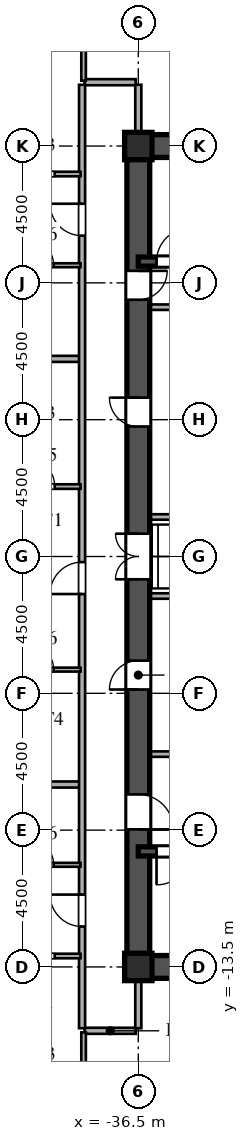
"""IFC4 building model, lengths in metres.
Left out: names, types, materials, properties, quantities, classifications, styles, units other than length and angle.
Written with IfcOpenShell. Run it as: python <this file> out.ifc"""

import sys

from ifc_helpers import new_model, si_unit, direction, frame, frame_2d, origin, origin_2d, place, context, subcontext, project, spatial, rectangle, i_section, extrude, source, transform, mapped, element, fill, save


model = new_model("IFC4")
c1 = context("Model", 3, precision=1e-05, world=origin(), true_north=direction((0.0, 1.0)))
c2 = subcontext(c1, "Body", "Model", "MODEL_VIEW")
j1 = project(units=[si_unit("LENGTHUNIT", "METRE"), si_unit("PLANEANGLEUNIT", "RADIAN")], contexts=[c1])
p1 = place(None, origin())
s1 = spatial("IfcSite", under=j1, at=p1, CompositionType="ELEMENT")
p2 = place(p1, origin())
s2 = spatial("IfcBuilding", under=s1, at=p2, CompositionType="ELEMENT")
p3 = place(p2, frame((0.0, 0.0, 22.5)))
s3 = spatial("IfcBuildingStorey", under=s2, at=p3, CompositionType="ELEMENT", Elevation=22.5)
m1 = source(origin(), c2, "Body", "SweptSolid", [
    extrude(i_section(OverallWidth=0.9, OverallDepth=0.9, WebThickness=0.036, FlangeThickness=0.055, at=origin_2d()), origin(), (0.0, 0.0, 1.0), 3.6),
])
for number, where, z_axis, x_axis in (
    (1, (-36.5, -13.5, 0.0), (0.0, 0.0, 1.0), (1.0, 0.0, 0.0)),
    (2, (-36.5, 13.5, 0.0), (0.0, 0.0, 1.0), (1.0, 0.0, 0.0)),
):
    element("IfcColumn", number, at=place(p3, frame(where, z_axis=z_axis, x_axis=x_axis)), inside=s3, PredefinedType="COLUMN", context=c2, shape_type="MappedRepresentation", body=[
        mapped(m1, transform((0.0, 0.0, 0.0), scale=1.0)),
    ])
for number, where, z_axis, x_axis in (
    (3, (-36.5, -13.5, 0.0), (0.0, 0.0, 1.0), (1.0, 0.0, 0.0)),
    (4, (-36.5, 13.5, 0.0), (0.0, 0.0, 1.0), (1.0, 0.0, 0.0)),
):
    element("IfcWall", number, at=place(p3, frame(where, z_axis=z_axis, x_axis=x_axis)), inside=s3, PredefinedType="SHEAR", context=c2, shape_type="SweptSolid", body=[
        extrude(rectangle(XDim=9.0, YDim=0.75, at=frame_2d((4.5, 0.0))), origin(), (0.0, 0.0, 1.0), 3.38),
    ])
p4 = place(p3, frame((-36.5, -13.65, 0.0), z_axis=(0.0, 0.0, 1.0), x_axis=(0.0, 1.0, 0.0)))
e5 = element("IfcWall", 5, at=p4, inside=s3, PredefinedType="SHEAR", context=c2, shape_type="SweptSolid", body=[
    extrude(rectangle(XDim=7.15, YDim=0.75, at=frame_2d((3.575, 0.0))), origin(), (0.0, 0.0, 1.0), 3.38),
])
p5 = place(p4, frame((4.675, 0.0, 0.0)))
e6 = element("IfcOpeningElement", 6, at=p5, cuts=e5, PredefinedType="OPENING", context=c2, shape_type="SweptSolid", body=[
    extrude(rectangle(XDim=1.15, YDim=2.2, at=frame_2d((0.575, 1.1))), frame((0.0, 0.385, 0.0), z_axis=(0.0, -1.0, 0.0), x_axis=(1.0, 0.0, 0.0)), (0.0, 0.0, 1.0), 0.77),
])
p6 = place(p3, frame((-36.5, -1.3, 0.0), z_axis=(0.0, 0.0, 1.0), x_axis=(0.0, 1.0, 0.0)))
e7 = element("IfcWall", 7, at=p6, inside=s3, PredefinedType="SHEAR", context=c2, shape_type="SweptSolid", body=[
    extrude(rectangle(XDim=2.6, YDim=0.75, at=frame_2d((1.3, 0.0))), origin(), (0.0, 0.0, 1.0), 3.38),
])
p7 = place(p6, frame((0.55, 0.0, 0.0)))
e8 = element("IfcOpeningElement", 8, at=p7, cuts=e7, PredefinedType="OPENING", context=c2, shape_type="SweptSolid", body=[
    extrude(rectangle(XDim=1.5, YDim=2.3, at=frame_2d((0.75, 1.15))), frame((0.0, 0.385, 0.0), z_axis=(0.0, -1.0, 0.0), x_axis=(1.0, 0.0, 0.0)), (0.0, 0.0, 1.0), 0.77),
])
p8 = place(p3, frame((-36.5, 8.2, 0.0), z_axis=(0.0, 0.0, 1.0), x_axis=(0.0, 1.0, 0.0)))
e9 = element("IfcWall", 9, at=p8, inside=s3, PredefinedType="SHEAR", context=c2, shape_type="SweptSolid", body=[
    extrude(rectangle(XDim=5.45, YDim=0.75, at=frame_2d((2.725, 0.0))), origin(), (0.0, 0.0, 1.0), 3.38),
])
p9 = place(p8, frame((0.245, 0.0, 0.0)))
e10 = element("IfcOpeningElement", 10, at=p9, cuts=e9, PredefinedType="OPENING", context=c2, shape_type="SweptSolid", body=[
    extrude(rectangle(XDim=0.95, YDim=2.15, at=frame_2d((0.475, 1.075))), frame((0.0, 0.385, 0.0), z_axis=(0.0, -1.0, 0.0), x_axis=(1.0, 0.0, 0.0)), (0.0, 0.0, 1.0), 0.77),
])
p10 = place(p3, frame((-36.5, -6.5, 0.0), z_axis=(0.0, 0.0, 1.0), x_axis=(0.0, 1.0, 0.0)))
e11 = element("IfcWall", 11, at=p10, inside=s3, PredefinedType="SHEAR", context=c2, shape_type="SweptSolid", body=[
    extrude(rectangle(XDim=5.2, YDim=0.75, at=frame_2d((2.6, 0.0))), origin(), (0.0, 0.0, 1.0), 3.38),
])
p11 = place(p10, frame((2.125, 0.0, 0.0)))
e12 = element("IfcOpeningElement", 12, at=p11, cuts=e11, PredefinedType="OPENING", context=c2, shape_type="SweptSolid", body=[
    extrude(rectangle(XDim=0.95, YDim=2.15, at=frame_2d((0.475, 1.075))), frame((0.0, 0.385, 0.0), z_axis=(0.0, -1.0, 0.0), x_axis=(1.0, 0.0, 0.0)), (0.0, 0.0, 1.0), 0.77),
])
p12 = place(p3, frame((-36.5, 1.3, 0.0), z_axis=(0.0, 0.0, 1.0), x_axis=(0.0, 1.0, 0.0)))
e13 = element("IfcWall", 13, at=p12, inside=s3, PredefinedType="SHEAR", context=c2, shape_type="SweptSolid", body=[
    extrude(rectangle(XDim=6.9, YDim=0.75, at=frame_2d((3.45, 0.0))), origin(), (0.0, 0.0, 1.0), 3.38),
])
p13 = place(p12, frame((2.975, 0.0, 0.0)))
e14 = element("IfcOpeningElement", 14, at=p13, cuts=e13, PredefinedType="OPENING", context=c2, shape_type="SweptSolid", body=[
    extrude(rectangle(XDim=0.95, YDim=2.15, at=frame_2d((0.475, 1.075))), frame((0.0, 0.385, 0.0), z_axis=(0.0, -1.0, 0.0), x_axis=(1.0, 0.0, 0.0)), (0.0, 0.0, 1.0), 0.77),
])
p14 = place(p3, frame((-36.5, -9.7, 0.0), z_axis=(0.0, 0.0, 1.0), x_axis=(1.0, 0.0, 0.0)))
e15 = element("IfcWall", 15, at=p14, inside=s3, PredefinedType="SHEAR", context=c2, shape_type="SweptSolid", body=[
    extrude(rectangle(XDim=9.0, YDim=0.3, at=frame_2d((4.5, 0.0))), origin(), (0.0, 0.0, 1.0), 3.38),
])
p15 = place(p14, frame((0.6, 0.0, 0.0)))
e16 = element("IfcOpeningElement", 16, at=p15, cuts=e15, PredefinedType="OPENING", context=c2, shape_type="SweptSolid", body=[
    extrude(rectangle(XDim=1.1, YDim=2.2, at=frame_2d((0.55, 1.1))), frame((0.0, 0.16, 0.0), z_axis=(0.0, -1.0, 0.0), x_axis=(1.0, 0.0, 0.0)), (0.0, 0.0, 1.0), 0.32),
])
p16 = place(p3, frame((-36.5, 9.7, 0.0), z_axis=(0.0, 0.0, 1.0), x_axis=(1.0, 0.0, 0.0)))
e17 = element("IfcWall", 17, at=p16, inside=s3, PredefinedType="SHEAR", context=c2, shape_type="SweptSolid", body=[
    extrude(rectangle(XDim=9.0, YDim=0.3, at=frame_2d((4.5, 0.0))), origin(), (0.0, 0.0, 1.0), 3.38),
])
p17 = place(p16, frame((0.6, 0.0, 0.0)))
e18 = element("IfcOpeningElement", 18, at=p17, cuts=e17, PredefinedType="OPENING", context=c2, shape_type="SweptSolid", body=[
    extrude(rectangle(XDim=1.1, YDim=2.2, at=frame_2d((0.55, 1.1))), frame((0.0, 0.16, 0.0), z_axis=(0.0, -1.0, 0.0), x_axis=(1.0, 0.0, 0.0)), (0.0, 0.0, 1.0), 0.32),
])
for number, where, z_axis, x_axis in (
    (19, (-36.15, -6.5, 0.0), (0.0, 0.0, 1.0), (1.0, 0.0, 0.0)),
    (20, (-36.15, 8.2, 0.0), (0.0, 0.0, 1.0), (1.0, 0.0, 0.0)),
):
    element("IfcWall", number, at=place(p3, frame(where, z_axis=z_axis, x_axis=x_axis)), inside=s3, PredefinedType="PARTITIONING", context=c2, shape_type="SweptSolid", body=[
        extrude(rectangle(XDim=5.7, YDim=0.18, at=frame_2d((2.85, 0.0))), origin(), (0.0, 0.0, 1.0), 3.38),
    ])
for number, where, z_axis, x_axis in (
    (21, (-36.15, -1.3, 0.0), (0.0, 0.0, 1.0), (1.0, 0.0, 0.0)),
    (22, (-36.15, 1.3, 0.0), (0.0, 0.0, 1.0), (1.0, 0.0, 0.0)),
):
    element("IfcWall", number, at=place(p3, frame(where, z_axis=z_axis, x_axis=x_axis)), inside=s3, PredefinedType="PARTITIONING", context=c2, shape_type="SweptSolid", body=[
        extrude(rectangle(XDim=2.95, YDim=0.18, at=frame_2d((1.475, 0.0))), origin(), (0.0, 0.0, 1.0), 3.38),
    ])
p18 = place(p3, frame((-38.265, -15.6, 0.0), z_axis=(0.0, 0.0, 1.0), x_axis=(1.0, 0.0, 0.0)))
e23 = element("IfcWall", 23, at=p18, inside=s3, PredefinedType="PARTITIONING", context=c2, shape_type="SweptSolid", body=[
    extrude(rectangle(XDim=1.68, YDim=0.2, at=frame_2d((0.84, 0.0))), origin(), (0.0, 0.0, 1.0), 3.38),
])
p19 = place(p3, frame((-41.05, -13.14, 0.0), z_axis=(0.0, 0.0, 1.0), x_axis=(1.0, 0.0, 0.0)))
e24 = element("IfcWall", 24, at=p19, inside=s3, PredefinedType="PARTITIONING", context=c2, shape_type="SweptSolid", body=[
    extrude(rectangle(XDim=2.65, YDim=0.15, at=frame_2d((1.325, 0.0))), origin(), (0.0, 0.0, 1.0), 3.38),
])
p20 = place(p19, frame((0.85, 0.0, 0.0)))
e25 = element("IfcOpeningElement", 25, at=p20, cuts=e24, PredefinedType="OPENING", context=c2, shape_type="SweptSolid", body=[
    extrude(rectangle(XDim=0.95, YDim=2.15, at=frame_2d((0.475, 1.075))), frame((0.0, 0.085, 0.0), z_axis=(0.0, -1.0, 0.0), x_axis=(1.0, 0.0, 0.0)), (0.0, 0.0, 1.0), 0.17),
])
p21 = place(p3, frame((-41.05, -10.14, 0.0), z_axis=(0.0, 0.0, 1.0), x_axis=(1.0, 0.0, 0.0)))
e26 = element("IfcWall", 26, at=p21, inside=s3, PredefinedType="PARTITIONING", context=c2, shape_type="SweptSolid", body=[
    extrude(rectangle(XDim=2.65, YDim=0.13, at=frame_2d((1.325, 0.0))), origin(), (0.0, 0.0, 1.0), 3.38),
])
p22 = place(p21, frame((0.885, 0.0, 0.0)))
e27 = element("IfcOpeningElement", 27, at=p22, cuts=e26, PredefinedType="OPENING", context=c2, shape_type="SweptSolid", body=[
    extrude(rectangle(XDim=0.88, YDim=2.1, at=frame_2d((0.44, 1.05))), frame((0.0, 0.075, 0.0), z_axis=(0.0, -1.0, 0.0), x_axis=(1.0, 0.0, 0.0)), (0.0, 0.0, 1.0), 0.15),
])
p23 = place(p3, frame((-72.505, -7.5, 0.0), z_axis=(0.0, 0.0, 1.0), x_axis=(1.0, 0.0, 0.0)))
e28 = element("IfcWall", 28, at=p23, inside=s3, PredefinedType="PARTITIONING", context=c2, shape_type="SweptSolid", body=[
    extrude(rectangle(XDim=34.075, YDim=0.2, at=frame_2d((17.038, 0.0))), origin(), (0.0, 0.0, 1.0), 3.38),
])
p24 = place(p3, frame((-41.05, -3.72, 0.0), z_axis=(0.0, 0.0, 1.0), x_axis=(1.0, 0.0, 0.0)))
e29 = element("IfcWall", 29, at=p24, inside=s3, PredefinedType="PARTITIONING", context=c2, shape_type="SweptSolid", body=[
    extrude(rectangle(XDim=2.65, YDim=0.13, at=frame_2d((1.325, 0.0))), origin(), (0.0, 0.0, 1.0), 3.38),
])
p25 = place(p24, frame((0.885, 0.0, 0.0)))
e30 = element("IfcOpeningElement", 30, at=p25, cuts=e29, PredefinedType="OPENING", context=c2, shape_type="SweptSolid", body=[
    extrude(rectangle(XDim=0.88, YDim=2.1, at=frame_2d((0.44, 1.05))), frame((0.0, 0.075, 0.0), z_axis=(0.0, -1.0, 0.0), x_axis=(1.0, 0.0, 0.0)), (0.0, 0.0, 1.0), 0.15),
])
p26 = place(p3, frame((-41.05, 2.3, 0.0), z_axis=(0.0, 0.0, 1.0), x_axis=(1.0, 0.0, 0.0)))
e31 = element("IfcWall", 31, at=p26, inside=s3, PredefinedType="PARTITIONING", context=c2, shape_type="SweptSolid", body=[
    extrude(rectangle(XDim=2.65, YDim=0.15, at=frame_2d((1.325, 0.0))), origin(), (0.0, 0.0, 1.0), 3.38),
])
p27 = place(p26, frame((0.85, 0.0, 0.0)))
e32 = element("IfcOpeningElement", 32, at=p27, cuts=e31, PredefinedType="OPENING", context=c2, shape_type="SweptSolid", body=[
    extrude(rectangle(XDim=0.95, YDim=2.15, at=frame_2d((0.475, 1.075))), frame((0.0, 0.085, 0.0), z_axis=(0.0, -1.0, 0.0), x_axis=(1.0, 0.0, 0.0)), (0.0, 0.0, 1.0), 0.17),
])
p28 = place(p3, frame((-72.505, 6.5, 0.0), z_axis=(0.0, 0.0, 1.0), x_axis=(1.0, 0.0, 0.0)))
e33 = element("IfcWall", 33, at=p28, inside=s3, PredefinedType="PARTITIONING", context=c2, shape_type="SweptSolid", body=[
    extrude(rectangle(XDim=34.075, YDim=0.2, at=frame_2d((17.038, 0.0))), origin(), (0.0, 0.0, 1.0), 3.38),
])
p29 = place(p3, frame((-41.05, 9.58, 0.0), z_axis=(0.0, 0.0, 1.0), x_axis=(1.0, 0.0, 0.0)))
e34 = element("IfcWall", 34, at=p29, inside=s3, PredefinedType="PARTITIONING", context=c2, shape_type="SweptSolid", body=[
    extrude(rectangle(XDim=2.65, YDim=0.13, at=frame_2d((1.325, 0.0))), origin(), (0.0, 0.0, 1.0), 3.38),
])
p30 = place(p29, frame((0.885, 0.0, 0.0)))
e35 = element("IfcOpeningElement", 35, at=p30, cuts=e34, PredefinedType="OPENING", context=c2, shape_type="SweptSolid", body=[
    extrude(rectangle(XDim=0.88, YDim=2.1, at=frame_2d((0.44, 1.05))), frame((0.0, 0.075, 0.0), z_axis=(0.0, -1.0, 0.0), x_axis=(1.0, 0.0, 0.0)), (0.0, 0.0, 1.0), 0.15),
])
p31 = place(p3, frame((-41.05, 12.58, 0.0), z_axis=(0.0, 0.0, 1.0), x_axis=(1.0, 0.0, 0.0)))
e36 = element("IfcWall", 36, at=p31, inside=s3, PredefinedType="PARTITIONING", context=c2, shape_type="SweptSolid", body=[
    extrude(rectangle(XDim=2.65, YDim=0.15, at=frame_2d((1.325, 0.0))), origin(), (0.0, 0.0, 1.0), 3.38),
])
p32 = place(p31, frame((0.85, 0.0, 0.0)))
e37 = element("IfcOpeningElement", 37, at=p32, cuts=e36, PredefinedType="OPENING", context=c2, shape_type="SweptSolid", body=[
    extrude(rectangle(XDim=0.95, YDim=2.15, at=frame_2d((0.475, 1.075))), frame((0.0, 0.085, 0.0), z_axis=(0.0, -1.0, 0.0), x_axis=(1.0, 0.0, 0.0)), (0.0, 0.0, 1.0), 0.17),
])
p33 = place(p3, frame((-38.265, 15.6, 0.0), z_axis=(0.0, 0.0, 1.0), x_axis=(1.0, 0.0, 0.0)))
e38 = element("IfcWall", 38, at=p33, inside=s3, PredefinedType="PARTITIONING", context=c2, shape_type="SweptSolid", body=[
    extrude(rectangle(XDim=1.68, YDim=0.2, at=frame_2d((0.84, 0.0))), origin(), (0.0, 0.0, 1.0), 3.38),
])
p34 = place(p3, frame((-38.35, -15.515, 0.0), z_axis=(0.0, 0.0, 1.0), x_axis=(0.0, 1.0, 0.0)))
e39 = element("IfcWall", 39, at=p34, inside=s3, PredefinedType="PARTITIONING", context=c2, shape_type="SweptSolid", body=[
    extrude(rectangle(XDim=31.03, YDim=0.2, at=frame_2d((15.515, 0.0))), origin(), (0.0, 0.0, 1.0), 3.38),
])
p35 = place(p34, frame((3.345, 0.0, 0.0)))
e40 = element("IfcOpeningElement", 40, at=p35, cuts=e39, PredefinedType="OPENING", context=c2, shape_type="SweptSolid", body=[
    extrude(rectangle(XDim=1.05, YDim=2.25, at=frame_2d((0.525, 1.125))), frame((0.0, 0.11, 0.0), z_axis=(0.0, -1.0, 0.0), x_axis=(1.0, 0.0, 0.0)), (0.0, 0.0, 1.0), 0.22),
])
p36 = place(p34, frame((14.28, 0.0, 0.0)))
e41 = element("IfcOpeningElement", 41, at=p36, cuts=e39, PredefinedType="OPENING", context=c2, shape_type="SweptSolid", body=[
    extrude(rectangle(XDim=1.05, YDim=2.25, at=frame_2d((0.525, 1.125))), frame((0.0, 0.11, 0.0), z_axis=(0.0, -1.0, 0.0), x_axis=(1.0, 0.0, 0.0)), (0.0, 0.0, 1.0), 0.22),
])
p37 = place(p34, frame((26.067, 0.0, 0.0)))
e42 = element("IfcOpeningElement", 42, at=p37, cuts=e39, PredefinedType="OPENING", context=c2, shape_type="SweptSolid", body=[
    extrude(rectangle(XDim=1.05, YDim=2.25, at=frame_2d((0.525, 1.125))), frame((0.0, 0.11, 0.0), z_axis=(0.0, -1.0, 0.0), x_axis=(1.0, 0.0, 0.0)), (0.0, 0.0, 1.0), 0.22),
])
p38 = place(p3, frame((-38.3, -23.878, 0.0), z_axis=(0.0, 0.0, 1.0), x_axis=(0.0, 1.0, 0.0)))
e43 = element("IfcWall", 43, at=p38, inside=s3, PredefinedType="PARTITIONING", context=c2, shape_type="SweptSolid", body=[
    extrude(rectangle(XDim=8.228, YDim=0.15, at=frame_2d((4.114, 0.0))), origin(), (0.0, 0.0, 1.0), 3.38),
])
p39 = place(p38, frame((1.357, 0.0, 0.0)))
e44 = element("IfcOpeningElement", 44, at=p39, cuts=e43, PredefinedType="OPENING", context=c2, shape_type="SweptSolid", body=[
    extrude(rectangle(XDim=0.95, YDim=2.15, at=frame_2d((0.475, 1.075))), frame((0.0, 0.085, 0.0), z_axis=(0.0, -1.0, 0.0), x_axis=(1.0, 0.0, 0.0)), (0.0, 0.0, 1.0), 0.17),
])
p40 = place(p3, frame((-38.3, 15.65, 0.0), z_axis=(0.0, 0.0, 1.0), x_axis=(0.0, 1.0, 0.0)))
e45 = element("IfcWall", 45, at=p40, inside=s3, PredefinedType="PARTITIONING", context=c2, shape_type="SweptSolid", body=[
    extrude(rectangle(XDim=8.228, YDim=0.15, at=frame_2d((4.114, 0.0))), origin(), (0.0, 0.0, 1.0), 3.38),
])
p41 = place(p40, frame((1.8, 0.0, 0.0)))
e46 = element("IfcOpeningElement", 46, at=p41, cuts=e45, PredefinedType="OPENING", context=c2, shape_type="SweptSolid", body=[
    extrude(rectangle(XDim=0.95, YDim=2.15, at=frame_2d((0.475, 1.075))), frame((0.0, 0.085, 0.0), z_axis=(0.0, -1.0, 0.0), x_axis=(1.0, 0.0, 0.0)), (0.0, 0.0, 1.0), 0.17),
])
for number, where, z_axis, x_axis in (
    (47, (-36.5, -15.515, 0.0), (0.0, 0.0, 1.0), (0.0, 1.0, 0.0)),
    (48, (-36.5, 13.88, 0.0), (0.0, 0.0, 1.0), (0.0, 1.0, 0.0)),
):
    element("IfcWall", number, at=place(p3, frame(where, z_axis=z_axis, x_axis=x_axis)), inside=s3, PredefinedType="PARTITIONING", context=c2, shape_type="SweptSolid", body=[
        extrude(rectangle(XDim=1.635, YDim=0.2, at=frame_2d((0.817, 0.0))), origin(), (0.0, 0.0, 1.0), 2.68),
    ])
m2 = source(origin(), c2, "Body", "SweptSolid", [
    extrude(rectangle(XDim=1.15, YDim=2.2, at=frame_2d((0.575, 1.1))), frame((0.0, 0.025, 0.0), z_axis=(0.0, -1.0, 0.0), x_axis=(1.0, 0.0, 0.0)), (0.0, 0.0, 1.0), 0.05),
])
p42 = place(p5, frame((1.15, 0.0, 0.0), z_axis=(0.0, 0.0, 1.0), x_axis=(-1.0, 0.0, 0.0)))
e49 = element("IfcDoor", 49, at=p42, inside=s3, OperationType="SINGLE_SWING_LEFT", PredefinedType="DOOR", context=c2, shape_type="MappedRepresentation", body=[
    mapped(m2, transform((0.0, 0.0, 0.0), scale=1.0)),
])
fill(e6, e49)
m3 = source(origin(), c2, "Body", "SweptSolid", [
    extrude(rectangle(XDim=1.5, YDim=2.3, at=frame_2d((0.75, 1.15))), frame((0.0, 0.025, 0.0), z_axis=(0.0, -1.0, 0.0), x_axis=(1.0, 0.0, 0.0)), (0.0, 0.0, 1.0), 0.05),
])
p43 = place(p7, origin())
e50 = element("IfcDoor", 50, at=p43, inside=s3, OperationType="DOUBLE_SWING_LEFT", PredefinedType="DOOR", context=c2, shape_type="MappedRepresentation", body=[
    mapped(m3, transform((0.0, 0.0, 0.0), scale=1.0)),
])
fill(e8, e50)
m4 = source(origin(), c2, "Body", "SweptSolid", [
    extrude(rectangle(XDim=0.95, YDim=2.15, at=frame_2d((0.475, 1.075))), frame((0.0, 0.025, 0.0), z_axis=(0.0, -1.0, 0.0), x_axis=(1.0, 0.0, 0.0)), (0.0, 0.0, 1.0), 0.05),
])
p44 = place(p9, frame((0.95, 0.0, 0.0), z_axis=(0.0, 0.0, 1.0), x_axis=(-1.0, 0.0, 0.0)))
e51 = element("IfcDoor", 51, at=p44, inside=s3, OperationType="SINGLE_SWING_RIGHT", PredefinedType="DOOR", context=c2, shape_type="MappedRepresentation", body=[
    mapped(m4, transform((0.0, 0.0, 0.0), scale=1.0)),
])
fill(e10, e51)
p45 = place(p11, origin())
e52 = element("IfcDoor", 52, at=p45, inside=s3, OperationType="SINGLE_SWING_LEFT", PredefinedType="DOOR", context=c2, shape_type="MappedRepresentation", body=[
    mapped(m4, transform((0.0, 0.0, 0.0), scale=1.0)),
])
fill(e12, e52)
p46 = place(p13, origin())
e53 = element("IfcDoor", 53, at=p46, inside=s3, OperationType="SINGLE_SWING_RIGHT", PredefinedType="DOOR", context=c2, shape_type="MappedRepresentation", body=[
    mapped(m4, transform((0.0, 0.0, 0.0), scale=1.0)),
])
fill(e14, e53)
m5 = source(origin(), c2, "Body", "SweptSolid", [
    extrude(rectangle(XDim=1.1, YDim=2.2, at=frame_2d((0.55, 1.1))), frame((0.0, 0.025, 0.0), z_axis=(0.0, -1.0, 0.0), x_axis=(1.0, 0.0, 0.0)), (0.0, 0.0, 1.0), 0.05),
])
p47 = place(p15, frame((1.1, 0.0, 0.0), z_axis=(0.0, 0.0, 1.0), x_axis=(-1.0, 0.0, 0.0)))
e54 = element("IfcDoor", 54, at=p47, inside=s3, OperationType="SINGLE_SWING_LEFT", PredefinedType="DOOR", context=c2, shape_type="MappedRepresentation", body=[
    mapped(m5, transform((0.0, 0.0, 0.0), scale=1.0)),
])
fill(e16, e54)
p48 = place(p17, origin())
e55 = element("IfcDoor", 55, at=p48, inside=s3, OperationType="SINGLE_SWING_RIGHT", PredefinedType="DOOR", context=c2, shape_type="MappedRepresentation", body=[
    mapped(m5, transform((0.0, 0.0, 0.0), scale=1.0)),
])
fill(e18, e55)
m6 = source(origin(), c2, "Body", "SweptSolid", [
    extrude(rectangle(XDim=0.88, YDim=2.1, at=frame_2d((0.44, 1.05))), frame((0.0, 0.025, 0.0), z_axis=(0.0, -1.0, 0.0), x_axis=(1.0, 0.0, 0.0)), (0.0, 0.0, 1.0), 0.05),
])
p49 = place(p22, origin())
e56 = element("IfcDoor", 56, at=p49, inside=s3, OperationType="SINGLE_SWING_LEFT", PredefinedType="DOOR", context=c2, shape_type="MappedRepresentation", body=[
    mapped(m6, transform((0.0, 0.0, 0.0), scale=1.0)),
])
fill(e27, e56)
p50 = place(p25, origin())
e57 = element("IfcDoor", 57, at=p50, inside=s3, OperationType="SINGLE_SWING_LEFT", PredefinedType="DOOR", context=c2, shape_type="MappedRepresentation", body=[
    mapped(m6, transform((0.0, 0.0, 0.0), scale=1.0)),
])
fill(e30, e57)
m7 = source(origin(), c2, "Body", "SweptSolid", [
    extrude(rectangle(XDim=0.95, YDim=2.15, at=frame_2d((0.475, 1.075))), frame((0.0, 0.025, 0.0), z_axis=(0.0, -1.0, 0.0), x_axis=(1.0, 0.0, 0.0)), (0.0, 0.0, 1.0), 0.05),
])
p51 = place(p27, origin())
e58 = element("IfcDoor", 58, at=p51, inside=s3, OperationType="SINGLE_SWING_LEFT", PredefinedType="DOOR", context=c2, shape_type="MappedRepresentation", body=[
    mapped(m7, transform((0.0, 0.0, 0.0), scale=1.0)),
])
fill(e32, e58)
p52 = place(p30, origin())
e59 = element("IfcDoor", 59, at=p52, inside=s3, OperationType="SINGLE_SWING_LEFT", PredefinedType="DOOR", context=c2, shape_type="MappedRepresentation", body=[
    mapped(m6, transform((0.0, 0.0, 0.0), scale=1.0)),
])
fill(e35, e59)
m8 = source(origin(), c2, "Body", "SweptSolid", [
    extrude(rectangle(XDim=1.05, YDim=2.25, at=frame_2d((0.525, 1.125))), frame((0.0, 0.025, 0.0), z_axis=(0.0, -1.0, 0.0), x_axis=(1.0, 0.0, 0.0)), (0.0, 0.0, 1.0), 0.05),
])
p53 = place(p35, origin())
e60 = element("IfcDoor", 60, at=p53, inside=s3, OperationType="SINGLE_SWING_RIGHT", PredefinedType="DOOR", context=c2, shape_type="MappedRepresentation", body=[
    mapped(m8, transform((0.0, 0.0, 0.0), scale=1.0)),
])
fill(e40, e60)
p54 = place(p36, origin())
e61 = element("IfcDoor", 61, at=p54, inside=s3, OperationType="SINGLE_SWING_LEFT", PredefinedType="DOOR", context=c2, shape_type="MappedRepresentation", body=[
    mapped(m8, transform((0.0, 0.0, 0.0), scale=1.0)),
])
fill(e41, e61)
p55 = place(p37, origin())
e62 = element("IfcDoor", 62, at=p55, inside=s3, OperationType="SINGLE_SWING_RIGHT", PredefinedType="DOOR", context=c2, shape_type="MappedRepresentation", body=[
    mapped(m8, transform((0.0, 0.0, 0.0), scale=1.0)),
])
fill(e42, e62)
save(model, sys.argv[1])
